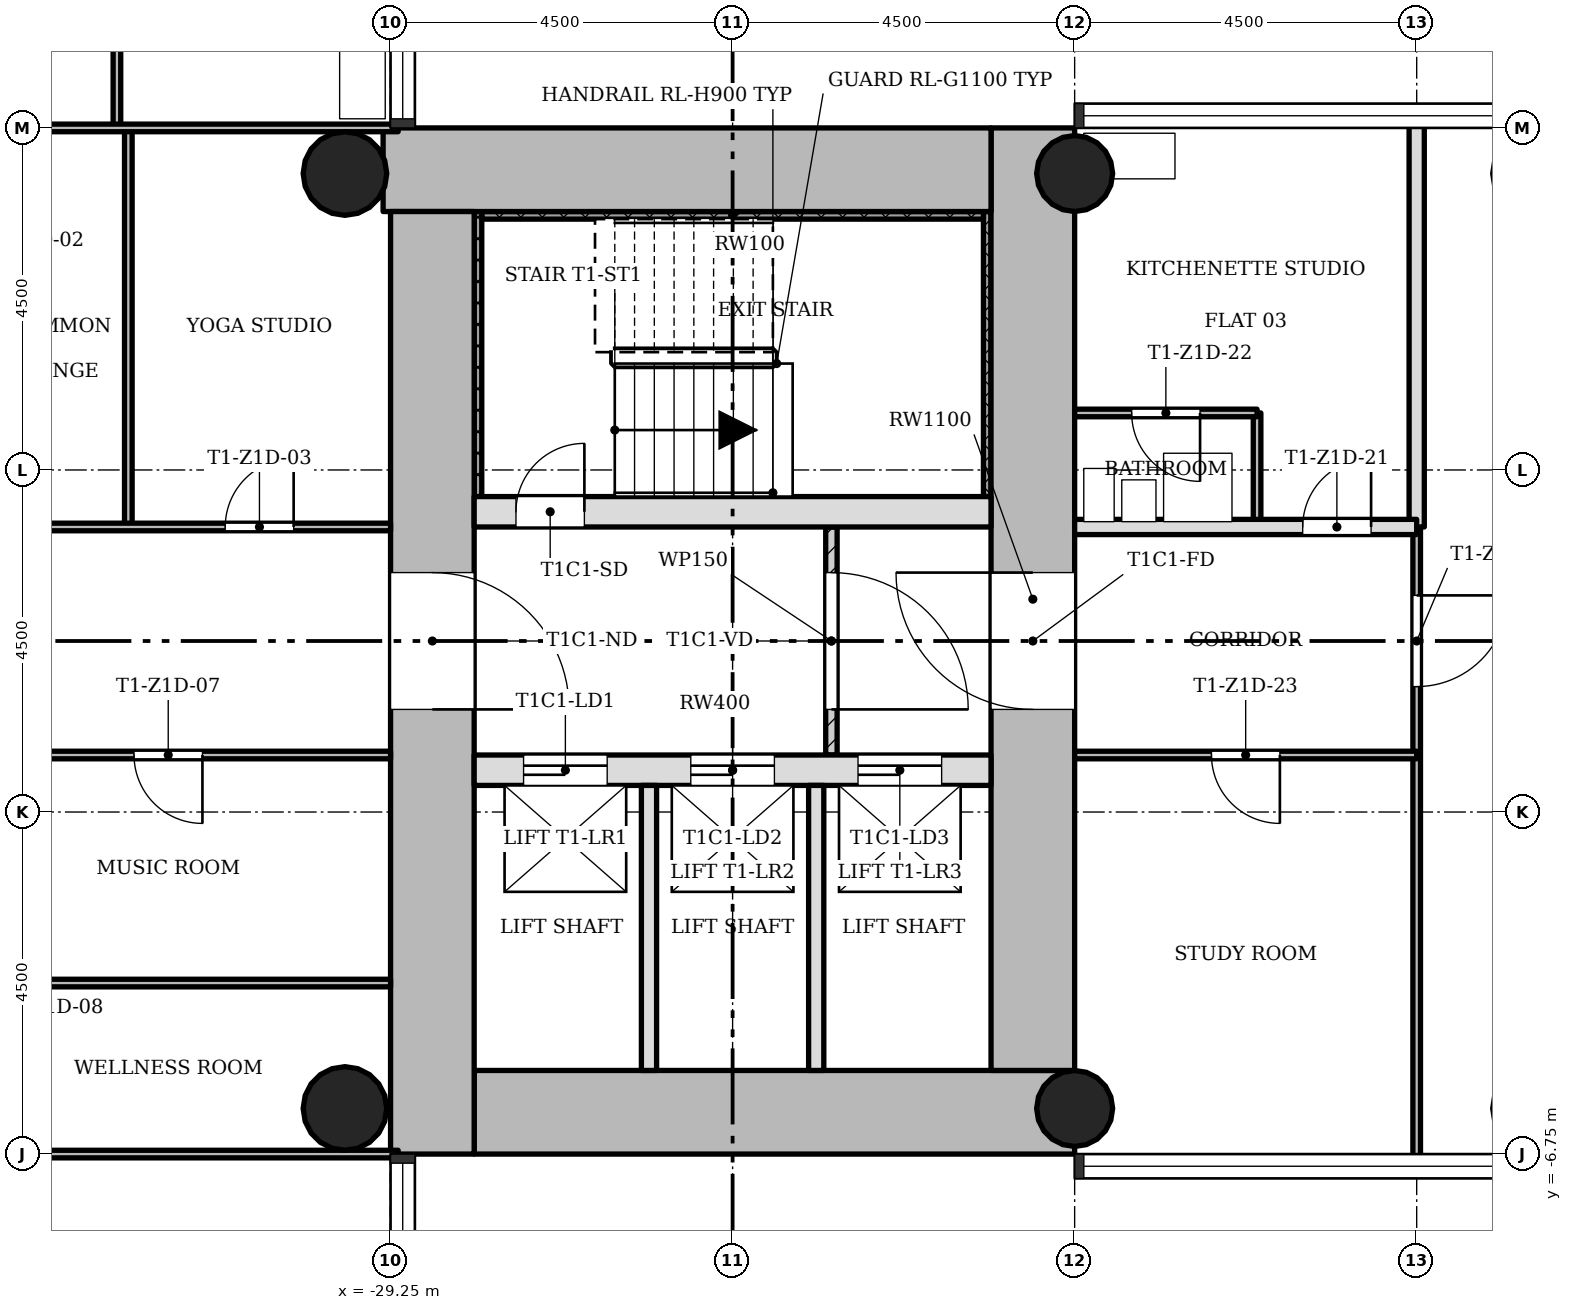
"""IFC4 building model, lengths in metres.
Left out: names, types, materials, properties, quantities, classifications, styles, units other than length and angle.
Written with IfcOpenShell. Run it as: python <this file> out.ifc"""

import sys

from ifc_helpers import new_model, si_unit, direction, frame, frame_2d, origin, origin_2d, place, context, subcontext, project, spatial, rectangle, hollow_circle, extrude, element, fill, save


model = new_model("IFC4")
c1 = context("Model", 3, precision=1e-05, world=origin(), true_north=direction((0.0, 1.0)))
c2 = subcontext(c1, "Body", "Model", "MODEL_VIEW")
j1 = project(units=[si_unit("LENGTHUNIT", "METRE"), si_unit("PLANEANGLEUNIT", "RADIAN")], contexts=[c1])
p1 = place(None, origin())
s1 = spatial("IfcSite", under=j1, at=p1, CompositionType="ELEMENT")
p2 = place(p1, origin())
s2 = spatial("IfcBuilding", under=s1, at=p2, CompositionType="ELEMENT")
p3 = place(p2, frame((0.0, 0.0, 55.1)))
s3 = spatial("IfcBuildingStorey", under=s2, at=p3, CompositionType="ELEMENT", Elevation=55.1)
p4 = place(p3, frame((-28.15, -6.2, 0.0), z_axis=(0.0, 0.0, 1.0), x_axis=(1.0, 0.0, 0.0)))
e1 = element("IfcWall", 1, at=p4, inside=s3, PredefinedType="SHEAR", context=c2, shape_type="SweptSolid", body=[
    extrude(rectangle(XDim=7.9, YDim=1.1, at=frame_2d((3.95, 0.0))), origin(), (0.0, 0.0, 1.0), 3.4),
])
p5 = place(p3, frame((-20.8, -5.65, 0.0), z_axis=(0.0, 0.0, 1.0), x_axis=(0.0, 1.0, 0.0)))
e2 = element("IfcWall", 2, at=p5, inside=s3, PredefinedType="SHEAR", context=c2, shape_type="SweptSolid", body=[
    extrude(rectangle(XDim=12.4, YDim=1.1, at=frame_2d((6.2, 0.0))), origin(), (0.0, 0.0, 1.0), 3.4),
])
p6 = place(p5, frame((4.75, 0.0, 0.0)))
e3 = element("IfcOpeningElement", 3, at=p6, cuts=e2, PredefinedType="OPENING", context=c2, shape_type="SweptSolid", body=[
    extrude(rectangle(XDim=1.8, YDim=2.1, at=frame_2d((0.9, 1.05))), frame((0.0, 0.56, 0.0), z_axis=(0.0, -1.0, 0.0), x_axis=(1.0, 0.0, 0.0)), (0.0, 0.0, 1.0), 1.12),
])
p7 = place(p3, frame((-21.35, 6.2, 0.0), z_axis=(0.0, 0.0, 1.0), x_axis=(-1.0, 0.0, 0.0)))
e4 = element("IfcWall", 4, at=p7, inside=s3, PredefinedType="SHEAR", context=c2, shape_type="SweptSolid", body=[
    extrude(rectangle(XDim=7.998, YDim=1.1, at=frame_2d((3.999, 0.0))), origin(), (0.0, 0.0, 1.0), 3.4),
])
p8 = place(p3, frame((-28.7, 5.65, 0.0), z_axis=(0.0, 0.0, 1.0), x_axis=(0.0, -1.0, 0.0)))
e5 = element("IfcWall", 5, at=p8, inside=s3, PredefinedType="SHEAR", context=c2, shape_type="SweptSolid", body=[
    extrude(rectangle(XDim=12.4, YDim=1.1, at=frame_2d((6.2, 0.0))), origin(), (0.0, 0.0, 1.0), 3.4),
])
p9 = place(p8, frame((4.75, 0.0, 0.0)))
e6 = element("IfcOpeningElement", 6, at=p9, cuts=e5, PredefinedType="OPENING", context=c2, shape_type="SweptSolid", body=[
    extrude(rectangle(XDim=1.8, YDim=2.1, at=frame_2d((0.9, 1.05))), frame((0.0, 0.56, 0.0), z_axis=(0.0, -1.0, 0.0), x_axis=(1.0, 0.0, 0.0)), (0.0, 0.0, 1.0), 1.12),
])
p10 = place(p3, frame((-28.15, -1.7, 0.0), z_axis=(0.0, 0.0, 1.0), x_axis=(1.0, 0.0, 0.0)))
e7 = element("IfcWall", 7, at=p10, inside=s3, PredefinedType="SHEAR", context=c2, shape_type="SweptSolid", body=[
    extrude(rectangle(XDim=6.8, YDim=0.4, at=frame_2d((3.4, 0.0))), origin(), (0.0, 0.0, 1.0), 3.4),
])
p11 = place(p10, frame((0.65, 0.0, 0.0)))
e8 = element("IfcOpeningElement", 8, at=p11, cuts=e7, PredefinedType="OPENING", context=c2, shape_type="SweptSolid", body=[
    extrude(rectangle(XDim=1.1, YDim=2.1, at=frame_2d((0.55, 1.05))), frame((0.0, 0.21, 0.0), z_axis=(0.0, -1.0, 0.0), x_axis=(1.0, 0.0, 0.0)), (0.0, 0.0, 1.0), 0.42),
])
p12 = place(p10, frame((2.85, 0.0, 0.0)))
e9 = element("IfcOpeningElement", 9, at=p12, cuts=e7, PredefinedType="OPENING", context=c2, shape_type="SweptSolid", body=[
    extrude(rectangle(XDim=1.1, YDim=2.1, at=frame_2d((0.55, 1.05))), frame((0.0, 0.21, 0.0), z_axis=(0.0, -1.0, 0.0), x_axis=(1.0, 0.0, 0.0)), (0.0, 0.0, 1.0), 0.42),
])
p13 = place(p10, frame((5.05, 0.0, 0.0)))
e10 = element("IfcOpeningElement", 10, at=p13, cuts=e7, PredefinedType="OPENING", context=c2, shape_type="SweptSolid", body=[
    extrude(rectangle(XDim=1.1, YDim=2.1, at=frame_2d((0.55, 1.05))), frame((0.0, 0.21, 0.0), z_axis=(0.0, -1.0, 0.0), x_axis=(1.0, 0.0, 0.0)), (0.0, 0.0, 1.0), 0.42),
])
p14 = place(p3, frame((-28.15, 1.7, 0.0), z_axis=(0.0, 0.0, 1.0), x_axis=(1.0, 0.0, 0.0)))
e11 = element("IfcWall", 11, at=p14, inside=s3, PredefinedType="SHEAR", context=c2, shape_type="SweptSolid", body=[
    extrude(rectangle(XDim=6.8, YDim=0.4, at=frame_2d((3.4, 0.0))), origin(), (0.0, 0.0, 1.0), 3.4),
])
p15 = place(p14, frame((0.55, 0.0, 0.0)))
e12 = element("IfcOpeningElement", 12, at=p15, cuts=e11, PredefinedType="OPENING", context=c2, shape_type="SweptSolid", body=[
    extrude(rectangle(XDim=0.9, YDim=2.1, at=frame_2d((0.45, 1.05))), frame((0.0, 0.21, 0.0), z_axis=(0.0, -1.0, 0.0), x_axis=(1.0, 0.0, 0.0)), (0.0, 0.0, 1.0), 0.42),
])
for number, where, z_axis, x_axis in (
    (13, (-20.25, -6.15, 0.0), (0.0, 0.0, 1.0), (1.0, 0.0, 0.0)),
    (14, (-20.25, 6.15, 0.0), (0.0, 0.0, 1.0), (1.0, 0.0, 0.0)),
):
    element("IfcColumn", number, at=place(p3, frame(where, z_axis=z_axis, x_axis=x_axis)), inside=s3, PredefinedType="COLUMN", context=c2, shape_type="SweptSolid", body=[
        extrude(hollow_circle(Radius=0.5, WallThickness=0.036, at=origin_2d()), origin(), (0.0, 0.0, 1.0), 3.4),
    ])
for number, where, z_axis, x_axis in (
    (15, (-29.85, -6.15, 0.0), (0.0, 0.0, 1.0), (1.0, 0.0, 0.0)),
    (16, (-29.85, 6.15, 0.0), (0.0, 0.0, 1.0), (1.0, 0.0, 0.0)),
):
    element("IfcColumn", number, at=place(p3, frame(where, z_axis=z_axis, x_axis=x_axis)), inside=s3, PredefinedType="COLUMN", context=c2, shape_type="SweptSolid", body=[
        extrude(hollow_circle(Radius=0.55, WallThickness=0.04, at=origin_2d()), origin(), (0.0, 0.0, 1.0), 3.4),
    ])
p16 = place(p3, frame((-23.45, -1.5, 0.0), z_axis=(0.0, 0.0, 1.0), x_axis=(0.0, 1.0, 0.0)))
e17 = element("IfcWall", 17, at=p16, inside=s3, PredefinedType="PARTITIONING", context=c2, shape_type="SweptSolid", body=[
    extrude(rectangle(XDim=3.0, YDim=0.15, at=frame_2d((1.5, 0.0))), origin(), (0.0, 0.0, 1.0), 3.0),
])
p17 = place(p16, frame((0.6, 0.0, 0.0)))
e18 = element("IfcOpeningElement", 18, at=p17, cuts=e17, PredefinedType="OPENING", context=c2, shape_type="SweptSolid", body=[
    extrude(rectangle(XDim=1.8, YDim=2.1, at=frame_2d((0.9, 1.05))), frame((0.0, 0.085, 0.0), z_axis=(0.0, -1.0, 0.0), x_axis=(1.0, 0.0, 0.0)), (0.0, 0.0, 1.0), 0.17),
])
for number, where, z_axis, x_axis in (
    (19, (-25.85, -5.65, 0.0), (0.0, 0.0, 1.0), (0.0, 1.0, 0.0)),
    (20, (-23.65, -5.65, 0.0), (0.0, 0.0, 1.0), (0.0, 1.0, 0.0)),
):
    element("IfcWall", number, at=place(p3, frame(where, z_axis=z_axis, x_axis=x_axis)), inside=s3, PredefinedType="SOLIDWALL", context=c2, shape_type="SweptSolid", body=[
        extrude(rectangle(XDim=3.75, YDim=0.2, at=frame_2d((1.875, 0.0))), origin(), (0.0, 0.0, 1.0), 3.0),
    ])
p18 = place(p3, frame((-32.85, 6.75, 0.0), z_axis=(0.0, 0.0, 1.0), x_axis=(0.0, 1.0, 0.0)))
e21 = element("IfcWall", 21, at=p18, inside=s3, PredefinedType="PARTITIONING", context=c2, shape_type="SweptSolid", body=[
    extrude(rectangle(XDim=9.0, YDim=0.1, at=frame_2d((4.5, 0.0))), origin(), (0.0, 0.0, 1.0), 3.0),
])
p19 = place(p18, frame((1.8, 0.0, 0.0)))
e22 = element("IfcOpeningElement", 22, at=p19, cuts=e21, PredefinedType="OPENING", context=c2, shape_type="SweptSolid", body=[
    extrude(rectangle(XDim=0.9, YDim=2.1, at=frame_2d((0.45, 1.05))), frame((0.0, 0.06, 0.0), z_axis=(0.0, -1.0, 0.0), x_axis=(1.0, 0.0, 0.0)), (0.0, 0.0, 1.0), 0.12),
])
p20 = place(p18, frame((6.3, 0.0, 0.0)))
e23 = element("IfcOpeningElement", 23, at=p20, cuts=e21, PredefinedType="OPENING", context=c2, shape_type="SweptSolid", body=[
    extrude(rectangle(XDim=0.9, YDim=2.1, at=frame_2d((0.45, 1.05))), frame((0.0, 0.06, 0.0), z_axis=(0.0, -1.0, 0.0), x_axis=(1.0, 0.0, 0.0)), (0.0, 0.0, 1.0), 0.12),
])
p21 = place(p3, frame((-32.7, 1.5, 0.0), z_axis=(0.0, 0.0, 1.0), x_axis=(0.0, 1.0, 0.0)))
e24 = element("IfcWall", 24, at=p21, inside=s3, PredefinedType="PARTITIONING", context=c2, shape_type="SweptSolid", body=[
    extrude(rectangle(XDim=5.25, YDim=0.1, at=frame_2d((2.625, 0.0))), origin(), (0.0, 0.0, 1.0), 3.0),
])
p22 = place(p3, frame((-17.85, 1.5, 0.0), z_axis=(0.0, 0.0, 1.0), x_axis=(0.0, 1.0, 0.0)))
e25 = element("IfcWall", 25, at=p22, inside=s3, PredefinedType="PARTITIONING", context=c2, shape_type="SweptSolid", body=[
    extrude(rectangle(XDim=1.5, YDim=0.1, at=frame_2d((0.75, 0.0))), origin(), (0.0, 0.0, 1.0), 3.0),
])
p23 = place(p3, frame((-15.75, -6.85, 0.0), z_axis=(0.0, 0.0, 1.0), x_axis=(0.0, 1.0, 0.0)))
e26 = element("IfcWall", 26, at=p23, inside=s3, PredefinedType="PARTITIONING", context=c2, shape_type="SweptSolid", body=[
    extrude(rectangle(XDim=8.35, YDim=0.1, at=frame_2d((4.175, 0.0))), origin(), (0.0, 0.0, 1.0), 3.0),
])
p24 = place(p23, frame((6.25, 0.0, 0.0)))
e27 = element("IfcOpeningElement", 27, at=p24, cuts=e26, PredefinedType="OPENING", context=c2, shape_type="SweptSolid", body=[
    extrude(rectangle(XDim=1.2, YDim=2.1, at=frame_2d((0.6, 1.05))), frame((0.0, 0.06, 0.0), z_axis=(0.0, -1.0, 0.0), x_axis=(1.0, 0.0, 0.0)), (0.0, 0.0, 1.0), 0.12),
])
p25 = place(p3, frame((-15.75, 1.5, 0.0), z_axis=(0.0, 0.0, 1.0), x_axis=(0.0, 1.0, 0.0)))
e28 = element("IfcWall", 28, at=p25, inside=s3, PredefinedType="SOLIDWALL", context=c2, shape_type="SweptSolid", body=[
    extrude(rectangle(XDim=5.35, YDim=0.2, at=frame_2d((2.675, 0.0))), origin(), (0.0, 0.0, 1.0), 3.0),
])
p26 = place(p3, frame((-35.1, -6.75, 0.0), z_axis=(0.0, 0.0, 1.0), x_axis=(1.0, 0.0, 0.0)))
e29 = element("IfcWall", 29, at=p26, inside=s3, PredefinedType="PARTITIONING", context=c2, shape_type="SweptSolid", body=[
    extrude(rectangle(XDim=5.95, YDim=0.1, at=frame_2d((2.975, 0.0))), origin(), (0.0, 0.0, 1.0), 3.0),
])
p27 = place(p3, frame((-35.1, -4.5, 0.0), z_axis=(0.0, 0.0, 1.0), x_axis=(1.0, 0.0, 0.0)))
e30 = element("IfcWall", 30, at=p27, inside=s3, PredefinedType="PARTITIONING", context=c2, shape_type="SweptSolid", body=[
    extrude(rectangle(XDim=5.85, YDim=0.1, at=frame_2d((2.925, 0.0))), origin(), (0.0, 0.0, 1.0), 3.0),
])
p28 = place(p3, frame((-35.1, -1.5, 0.0), z_axis=(0.0, 0.0, 1.0), x_axis=(1.0, 0.0, 0.0)))
e31 = element("IfcWall", 31, at=p28, inside=s3, PredefinedType="PARTITIONING", context=c2, shape_type="SweptSolid", body=[
    extrude(rectangle(XDim=5.85, YDim=0.1, at=frame_2d((2.925, 0.0))), origin(), (0.0, 0.0, 1.0), 3.0),
])
p29 = place(p28, frame((2.475, 0.0, 0.0)))
e32 = element("IfcOpeningElement", 32, at=p29, cuts=e31, PredefinedType="OPENING", context=c2, shape_type="SweptSolid", body=[
    extrude(rectangle(XDim=0.9, YDim=2.1, at=frame_2d((0.45, 1.05))), frame((0.0, 0.06, 0.0), z_axis=(0.0, -1.0, 0.0), x_axis=(1.0, 0.0, 0.0)), (0.0, 0.0, 1.0), 0.12),
])
p30 = place(p3, frame((-20.25, -1.5, 0.0), z_axis=(0.0, 0.0, 1.0), x_axis=(1.0, 0.0, 0.0)))
e33 = element("IfcWall", 33, at=p30, inside=s3, PredefinedType="PARTITIONING", context=c2, shape_type="SweptSolid", body=[
    extrude(rectangle(XDim=4.5, YDim=0.1, at=frame_2d((2.25, 0.0))), origin(), (0.0, 0.0, 1.0), 3.0),
])
p31 = place(p30, frame((1.8, 0.0, 0.0)))
e34 = element("IfcOpeningElement", 34, at=p31, cuts=e33, PredefinedType="OPENING", context=c2, shape_type="SweptSolid", body=[
    extrude(rectangle(XDim=0.9, YDim=2.1, at=frame_2d((0.45, 1.05))), frame((0.0, 0.06, 0.0), z_axis=(0.0, -1.0, 0.0), x_axis=(1.0, 0.0, 0.0)), (0.0, 0.0, 1.0), 0.12),
])
p32 = place(p3, frame((-35.1, 1.5, 0.0), z_axis=(0.0, 0.0, 1.0), x_axis=(1.0, 0.0, 0.0)))
e35 = element("IfcWall", 35, at=p32, inside=s3, PredefinedType="PARTITIONING", context=c2, shape_type="SweptSolid", body=[
    extrude(rectangle(XDim=5.85, YDim=0.1, at=frame_2d((2.925, 0.0))), origin(), (0.0, 0.0, 1.0), 3.0),
])
p33 = place(p32, frame((3.675, 0.0, 0.0)))
e36 = element("IfcOpeningElement", 36, at=p33, cuts=e35, PredefinedType="OPENING", context=c2, shape_type="SweptSolid", body=[
    extrude(rectangle(XDim=0.9, YDim=2.1, at=frame_2d((0.45, 1.05))), frame((0.0, 0.06, 0.0), z_axis=(0.0, -1.0, 0.0), x_axis=(1.0, 0.0, 0.0)), (0.0, 0.0, 1.0), 0.12),
])
p34 = place(p3, frame((-20.25, 1.5, 0.0), z_axis=(0.0, 0.0, 1.0), x_axis=(1.0, 0.0, 0.0)))
e37 = element("IfcWall", 37, at=p34, inside=s3, PredefinedType="SOLIDWALL", context=c2, shape_type="SweptSolid", body=[
    extrude(rectangle(XDim=4.5, YDim=0.2, at=frame_2d((2.25, 0.0))), origin(), (0.0, 0.0, 1.0), 3.0),
])
p35 = place(p34, frame((3.0, 0.0, 0.0)))
e38 = element("IfcOpeningElement", 38, at=p35, cuts=e37, PredefinedType="OPENING", context=c2, shape_type="SweptSolid", body=[
    extrude(rectangle(XDim=0.9, YDim=2.1, at=frame_2d((0.45, 1.05))), frame((0.0, 0.11, 0.0), z_axis=(0.0, -1.0, 0.0), x_axis=(1.0, 0.0, 0.0)), (0.0, 0.0, 1.0), 0.22),
])
p36 = place(p3, frame((-20.25, 3.0, 0.0), z_axis=(0.0, 0.0, 1.0), x_axis=(1.0, 0.0, 0.0)))
e39 = element("IfcWall", 39, at=p36, inside=s3, PredefinedType="PARTITIONING", context=c2, shape_type="SweptSolid", body=[
    extrude(rectangle(XDim=2.4, YDim=0.1, at=frame_2d((1.2, 0.0))), origin(), (0.0, 0.0, 1.0), 3.0),
])
p37 = place(p36, frame((0.75, 0.0, 0.0)))
e40 = element("IfcOpeningElement", 40, at=p37, cuts=e39, PredefinedType="OPENING", context=c2, shape_type="SweptSolid", body=[
    extrude(rectangle(XDim=0.9, YDim=2.1, at=frame_2d((0.45, 1.05))), frame((0.0, 0.06, 0.0), z_axis=(0.0, -1.0, 0.0), x_axis=(1.0, 0.0, 0.0)), (0.0, 0.0, 1.0), 0.12),
])
p38 = place(p3, frame((-35.1, 6.75, 0.0), z_axis=(0.0, 0.0, 1.0), x_axis=(1.0, 0.0, 0.0)))
e41 = element("IfcWall", 41, at=p38, inside=s3, PredefinedType="PARTITIONING", context=c2, shape_type="SweptSolid", body=[
    extrude(rectangle(XDim=5.95, YDim=0.1, at=frame_2d((2.975, 0.0))), origin(), (0.0, 0.0, 1.0), 3.0),
])
p39 = place(p3, frame((-21.4, 1.9, 0.0), z_axis=(0.0, 0.0, 1.0), x_axis=(0.0, 1.0, 0.0)))
e42 = element("IfcWall", 42, at=p39, inside=s3, PredefinedType="SHEAR", context=c2, shape_type="SweptSolid", body=[
    extrude(rectangle(XDim=3.75, YDim=0.1, at=frame_2d((1.875, 0.0))), origin(), (0.0, 0.0, 1.0), 3.4),
])
p40 = place(p3, frame((-28.05, 5.6, 0.0), z_axis=(0.0, 0.0, 1.0), x_axis=(1.0, 0.0, 0.0)))
e43 = element("IfcWall", 43, at=p40, inside=s3, PredefinedType="SHEAR", context=c2, shape_type="SweptSolid", body=[
    extrude(rectangle(XDim=6.6, YDim=0.1, at=frame_2d((3.3, 0.0))), origin(), (0.0, 0.0, 1.0), 3.4),
])
p41 = place(p3, frame((-28.1, 1.9, 0.0), z_axis=(0.0, 0.0, 1.0), x_axis=(0.0, 1.0, 0.0)))
e44 = element("IfcWall", 44, at=p41, inside=s3, PredefinedType="SHEAR", context=c2, shape_type="SweptSolid", body=[
    extrude(rectangle(XDim=3.75, YDim=0.1, at=frame_2d((1.875, 0.0))), origin(), (0.0, 0.0, 1.0), 3.4),
])
p42 = place(p17, origin())
e45 = element("IfcDoor", 45, at=p42, inside=s3, OperationType="SINGLE_SWING_LEFT", PredefinedType="DOOR", context=c2, shape_type="SweptSolid", body=[
    extrude(rectangle(XDim=1.8, YDim=2.1, at=frame_2d((0.9, 1.05))), frame((0.0, 0.025, 0.0), z_axis=(0.0, -1.0, 0.0), x_axis=(1.0, 0.0, 0.0)), (0.0, 0.0, 1.0), 0.05),
])
fill(e18, e45)
p43 = place(p33, origin())
e46 = element("IfcDoor", 46, at=p43, inside=s3, OperationType="SINGLE_SWING_LEFT", PredefinedType="DOOR", context=c2, shape_type="SweptSolid", body=[
    extrude(rectangle(XDim=0.9, YDim=2.1, at=frame_2d((0.45, 1.05))), frame((0.0, 0.025, 0.0), z_axis=(0.0, -1.0, 0.0), x_axis=(1.0, 0.0, 0.0)), (0.0, 0.0, 1.0), 0.05),
])
fill(e36, e46)
p44 = place(p29, origin())
e47 = element("IfcDoor", 47, at=p44, inside=s3, OperationType="SINGLE_SWING_RIGHT", PredefinedType="DOOR", context=c2, shape_type="SweptSolid", body=[
    extrude(rectangle(XDim=0.9, YDim=2.1, at=frame_2d((0.45, 1.05))), frame((0.0, 0.025, 0.0), z_axis=(0.0, -1.0, 0.0), x_axis=(1.0, 0.0, 0.0)), (0.0, 0.0, 1.0), 0.05),
])
fill(e32, e47)
p45 = place(p35, origin())
e48 = element("IfcDoor", 48, at=p45, inside=s3, OperationType="SINGLE_SWING_LEFT", PredefinedType="DOOR", context=c2, shape_type="SweptSolid", body=[
    extrude(rectangle(XDim=0.9, YDim=2.1, at=frame_2d((0.45, 1.05))), frame((0.0, 0.025, 0.0), z_axis=(0.0, -1.0, 0.0), x_axis=(1.0, 0.0, 0.0)), (0.0, 0.0, 1.0), 0.05),
])
fill(e38, e48)
p46 = place(p37, origin())
e49 = element("IfcDoor", 49, at=p46, inside=s3, OperationType="SINGLE_SWING_RIGHT", PredefinedType="DOOR", context=c2, shape_type="SweptSolid", body=[
    extrude(rectangle(XDim=0.9, YDim=2.1, at=frame_2d((0.45, 1.05))), frame((0.0, 0.025, 0.0), z_axis=(0.0, -1.0, 0.0), x_axis=(1.0, 0.0, 0.0)), (0.0, 0.0, 1.0), 0.05),
])
fill(e40, e49)
p47 = place(p31, origin())
e50 = element("IfcDoor", 50, at=p47, inside=s3, OperationType="SINGLE_SWING_RIGHT", PredefinedType="DOOR", context=c2, shape_type="SweptSolid", body=[
    extrude(rectangle(XDim=0.9, YDim=2.1, at=frame_2d((0.45, 1.05))), frame((0.0, 0.025, 0.0), z_axis=(0.0, -1.0, 0.0), x_axis=(1.0, 0.0, 0.0)), (0.0, 0.0, 1.0), 0.05),
])
fill(e34, e50)
p48 = place(p24, origin())
e51 = element("IfcDoor", 51, at=p48, inside=s3, OperationType="SINGLE_SWING_RIGHT", PredefinedType="DOOR", context=c2, shape_type="SweptSolid", body=[
    extrude(rectangle(XDim=1.2, YDim=2.1, at=frame_2d((0.6, 1.05))), frame((0.0, 0.025, 0.0), z_axis=(0.0, -1.0, 0.0), x_axis=(1.0, 0.0, 0.0)), (0.0, 0.0, 1.0), 0.05),
])
fill(e27, e51)
p49 = place(p15, origin())
e52 = element("IfcDoor", 52, at=p49, inside=s3, OperationType="SINGLE_SWING_LEFT", PredefinedType="DOOR", context=c2, shape_type="SweptSolid", body=[
    extrude(rectangle(XDim=0.9, YDim=2.1, at=frame_2d((0.45, 1.05))), frame((0.0, 0.025, 0.0), z_axis=(0.0, -1.0, 0.0), x_axis=(1.0, 0.0, 0.0)), (0.0, 0.0, 1.0), 0.05),
])
fill(e12, e52)
p50 = place(p11, origin())
e53 = element("IfcDoor", 53, at=p50, inside=s3, OperationType="SLIDING_TO_LEFT", PredefinedType="DOOR", context=c2, shape_type="SweptSolid", body=[
    extrude(rectangle(XDim=1.1, YDim=2.1, at=frame_2d((0.55, 1.05))), frame((0.0, 0.025, 0.0), z_axis=(0.0, -1.0, 0.0), x_axis=(1.0, 0.0, 0.0)), (0.0, 0.0, 1.0), 0.05),
])
fill(e8, e53)
p51 = place(p12, origin())
e54 = element("IfcDoor", 54, at=p51, inside=s3, OperationType="SLIDING_TO_LEFT", PredefinedType="DOOR", context=c2, shape_type="SweptSolid", body=[
    extrude(rectangle(XDim=1.1, YDim=2.1, at=frame_2d((0.55, 1.05))), frame((0.0, 0.025, 0.0), z_axis=(0.0, -1.0, 0.0), x_axis=(1.0, 0.0, 0.0)), (0.0, 0.0, 1.0), 0.05),
])
fill(e9, e54)
p52 = place(p13, origin())
e55 = element("IfcDoor", 55, at=p52, inside=s3, OperationType="SLIDING_TO_LEFT", PredefinedType="DOOR", context=c2, shape_type="SweptSolid", body=[
    extrude(rectangle(XDim=1.1, YDim=2.1, at=frame_2d((0.55, 1.05))), frame((0.0, 0.025, 0.0), z_axis=(0.0, -1.0, 0.0), x_axis=(1.0, 0.0, 0.0)), (0.0, 0.0, 1.0), 0.05),
])
fill(e10, e55)
p53 = place(p9, origin())
e56 = element("IfcDoor", 56, at=p53, inside=s3, OperationType="SINGLE_SWING_LEFT", PredefinedType="DOOR", context=c2, shape_type="SweptSolid", body=[
    extrude(rectangle(XDim=1.8, YDim=2.1, at=frame_2d((0.9, 1.05))), frame((0.0, 0.025, 0.0), z_axis=(0.0, -1.0, 0.0), x_axis=(1.0, 0.0, 0.0)), (0.0, 0.0, 1.0), 0.05),
])
fill(e6, e56)
p54 = place(p6, origin())
e57 = element("IfcDoor", 57, at=p54, inside=s3, OperationType="SINGLE_SWING_LEFT", PredefinedType="DOOR", context=c2, shape_type="SweptSolid", body=[
    extrude(rectangle(XDim=1.8, YDim=2.1, at=frame_2d((0.9, 1.05))), frame((0.0, 0.025, 0.0), z_axis=(0.0, -1.0, 0.0), x_axis=(1.0, 0.0, 0.0)), (0.0, 0.0, 1.0), 0.05),
])
fill(e3, e57)
save(model, sys.argv[1])
